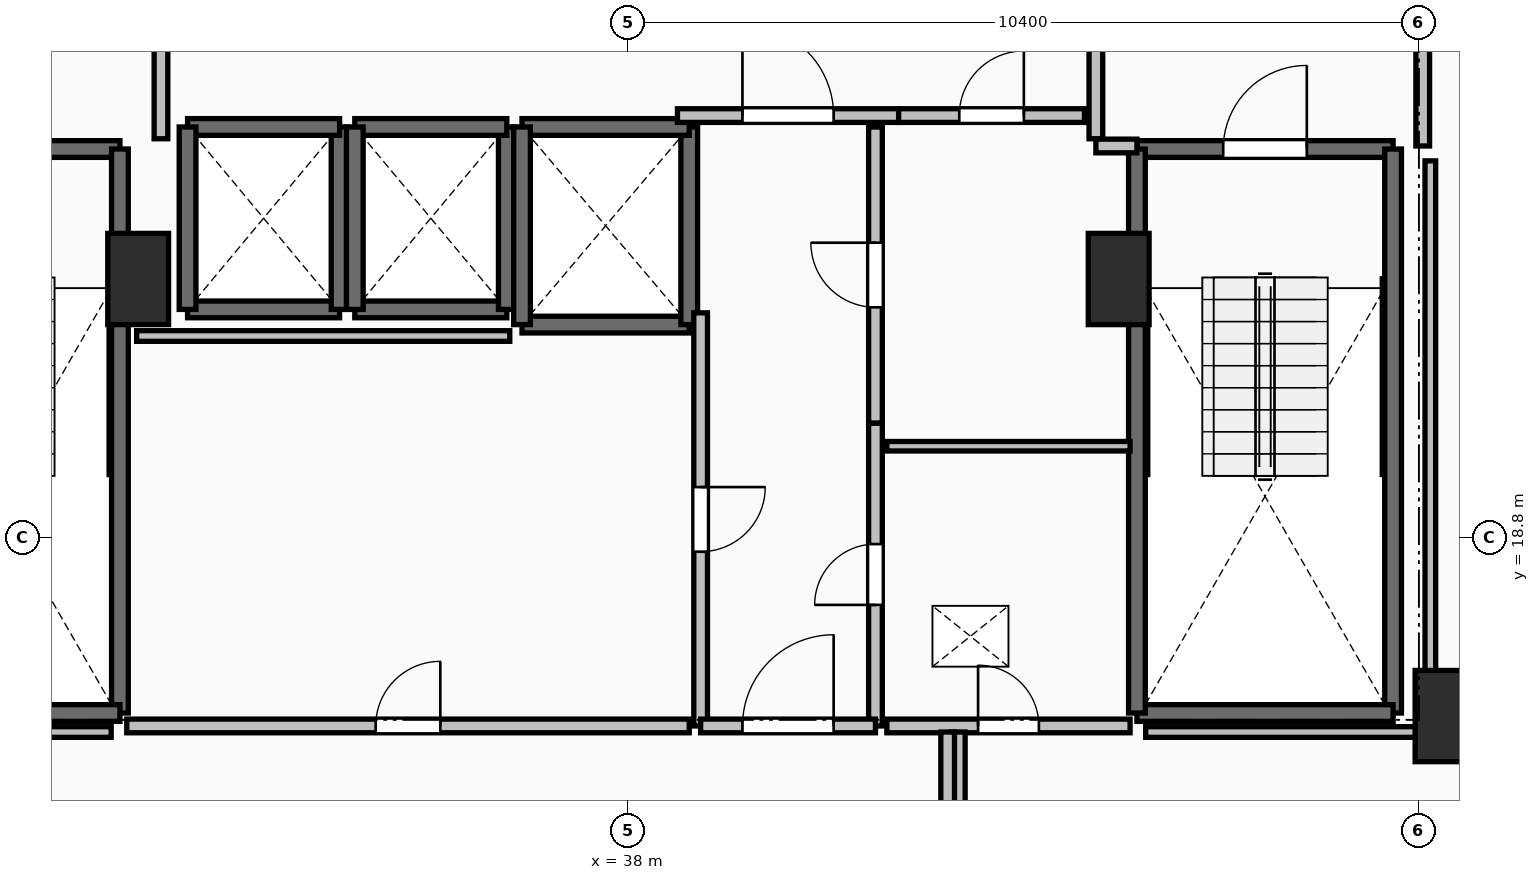
"""IFC4 building model, lengths in metres.
Left out: names, types, materials, properties, quantities, classifications, styles, units other than length and angle.
Written with IfcOpenShell. Run it as: python <this file> out.ifc"""

import sys

from ifc_helpers import new_model, si_unit, direction, frame, frame_2d, origin, origin_2d, place, context, subcontext, project, spatial, rectangle, extrude, element, fill, save


model = new_model("IFC4")
c1 = context("Model", 3, precision=1e-05, world=origin(), true_north=direction((0.0, 1.0)))
c2 = subcontext(c1, "Body", "Model", "MODEL_VIEW")
j1 = project(units=[si_unit("LENGTHUNIT", "METRE"), si_unit("PLANEANGLEUNIT", "RADIAN")], contexts=[c1])
p1 = place(None, origin())
s1 = spatial("IfcSite", under=j1, at=p1, CompositionType="ELEMENT")
p2 = place(p1, origin())
s2 = spatial("IfcBuilding", under=s1, at=p2, CompositionType="ELEMENT")
p3 = place(p2, frame((0.0, 0.0, 38.0)))
s3 = spatial("IfcBuildingStorey", under=s2, at=p3, CompositionType="ELEMENT", Elevation=38.0)
for number, where, z_axis, x_axis in (
    (1, (31.55, 22.2, 0.0), (0.0, 0.0, 1.0), (1.0, 0.0, 0.0)),
    (2, (48.75, 16.45, 0.0), (0.0, 0.0, 1.0), (1.0, 0.0, 0.0)),
    (3, (44.45, 22.2, 0.0), (0.0, 0.0, 1.0), (1.0, 0.0, 0.0)),
):
    element("IfcColumn", number, at=place(p3, frame(where, z_axis=z_axis, x_axis=x_axis)), inside=s3, PredefinedType="PILASTER", context=c2, shape_type="SweptSolid", body=[
        extrude(rectangle(XDim=0.8, YDim=1.2, at=origin_2d()), origin(), (0.0, 0.0, 1.0), 3.5),
    ])
p4 = place(p3, frame((27.94, 23.91, 0.0), z_axis=(0.0, 0.0, 1.0), x_axis=(1.0, 0.0, 0.0)))
e4 = element("IfcWall", 4, at=p4, inside=s3, PredefinedType="SOLIDWALL", context=c2, shape_type="SweptSolid", body=[
    extrude(rectangle(XDim=3.37, YDim=0.22, at=frame_2d((1.685, 0.0))), origin(), (0.0, 0.0, 1.0), 3.24),
])
p5 = place(p4, frame((1.135, 0.0, 0.0)))
e5 = element("IfcOpeningElement", 5, at=p5, cuts=e4, PredefinedType="OPENING", context=c2, shape_type="SweptSolid", body=[
    extrude(rectangle(XDim=1.1, YDim=2.15, at=frame_2d((0.55, 1.075))), frame((0.0, 0.125, 0.0), z_axis=(0.0, -1.0, 0.0), x_axis=(1.0, 0.0, 0.0)), (0.0, 0.0, 1.0), 0.25),
])
p6 = place(p3, frame((31.31, 23.91, 0.0), z_axis=(0.0, 0.0, 1.0), x_axis=(0.0, -1.0, 0.0)))
e6 = element("IfcWall", 6, at=p6, inside=s3, PredefinedType="SOLIDWALL", context=c2, shape_type="SweptSolid", body=[
    extrude(rectangle(XDim=7.42, YDim=0.22, at=frame_2d((3.71, 0.0))), origin(), (0.0, 0.0, 1.0), 3.24),
])
p7 = place(p3, frame((31.31, 16.49, 0.0), z_axis=(0.0, 0.0, 1.0), x_axis=(-1.0, 0.0, 0.0)))
e7 = element("IfcWall", 7, at=p7, inside=s3, PredefinedType="SOLIDWALL", context=c2, shape_type="SweptSolid", body=[
    extrude(rectangle(XDim=3.37, YDim=0.22, at=frame_2d((1.685, 0.0))), origin(), (0.0, 0.0, 1.0), 3.24),
])
p8 = place(p3, frame((44.69, 23.91, 0.0), z_axis=(0.0, 0.0, 1.0), x_axis=(1.0, 0.0, 0.0)))
e8 = element("IfcWall", 8, at=p8, inside=s3, PredefinedType="SOLIDWALL", context=c2, shape_type="SweptSolid", body=[
    extrude(rectangle(XDim=3.37, YDim=0.22, at=frame_2d((1.685, 0.0))), origin(), (0.0, 0.0, 1.0), 3.24),
])
p9 = place(p8, frame((1.135, 0.0, 0.0)))
e9 = element("IfcOpeningElement", 9, at=p9, cuts=e8, PredefinedType="OPENING", context=c2, shape_type="SweptSolid", body=[
    extrude(rectangle(XDim=1.1, YDim=2.15, at=frame_2d((0.55, 1.075))), frame((0.0, 0.125, 0.0), z_axis=(0.0, -1.0, 0.0), x_axis=(1.0, 0.0, 0.0)), (0.0, 0.0, 1.0), 0.25),
])
p10 = place(p3, frame((48.06, 23.91, 0.0), z_axis=(0.0, 0.0, 1.0), x_axis=(0.0, -1.0, 0.0)))
e10 = element("IfcWall", 10, at=p10, inside=s3, PredefinedType="SOLIDWALL", context=c2, shape_type="SweptSolid", body=[
    extrude(rectangle(XDim=7.42, YDim=0.22, at=frame_2d((3.71, 0.0))), origin(), (0.0, 0.0, 1.0), 3.24),
])
p11 = place(p3, frame((48.06, 16.49, 0.0), z_axis=(0.0, 0.0, 1.0), x_axis=(-1.0, 0.0, 0.0)))
e11 = element("IfcWall", 11, at=p11, inside=s3, PredefinedType="SOLIDWALL", context=c2, shape_type="SweptSolid", body=[
    extrude(rectangle(XDim=3.37, YDim=0.22, at=frame_2d((1.685, 0.0))), origin(), (0.0, 0.0, 1.0), 3.24),
])
p12 = place(p3, frame((44.69, 16.49, 0.0), z_axis=(0.0, 0.0, 1.0), x_axis=(0.0, 1.0, 0.0)))
e12 = element("IfcWall", 12, at=p12, inside=s3, PredefinedType="SOLIDWALL", context=c2, shape_type="SweptSolid", body=[
    extrude(rectangle(XDim=7.42, YDim=0.22, at=frame_2d((3.71, 0.0))), origin(), (0.0, 0.0, 1.0), 3.24),
])
p13 = place(p3, frame((32.2, 21.8, 0.0), z_axis=(0.0, 0.0, 1.0), x_axis=(1.0, 0.0, 0.0)))
e13 = element("IfcWall", 13, at=p13, inside=s3, PredefinedType="SOLIDWALL", context=c2, shape_type="SweptSolid", body=[
    extrude(rectangle(XDim=2.0, YDim=0.22, at=frame_2d((1.0, 0.0))), origin(), (0.0, 0.0, 1.0), 3.24),
])
p14 = place(p3, frame((34.2, 21.8, 0.0), z_axis=(0.0, 0.0, 1.0), x_axis=(0.0, 1.0, 0.0)))
e14 = element("IfcWall", 14, at=p14, inside=s3, PredefinedType="SOLIDWALL", context=c2, shape_type="SweptSolid", body=[
    extrude(rectangle(XDim=2.4, YDim=0.22, at=frame_2d((1.2, 0.0))), origin(), (0.0, 0.0, 1.0), 3.24),
])
p15 = place(p3, frame((34.2, 24.2, 0.0), z_axis=(0.0, 0.0, 1.0), x_axis=(-1.0, 0.0, 0.0)))
e15 = element("IfcWall", 15, at=p15, inside=s3, PredefinedType="SOLIDWALL", context=c2, shape_type="SweptSolid", body=[
    extrude(rectangle(XDim=2.0, YDim=0.22, at=frame_2d((1.0, 0.0))), origin(), (0.0, 0.0, 1.0), 3.24),
])
p16 = place(p3, frame((32.2, 24.2, 0.0), z_axis=(0.0, 0.0, 1.0), x_axis=(0.0, -1.0, 0.0)))
e16 = element("IfcWall", 16, at=p16, inside=s3, PredefinedType="SOLIDWALL", context=c2, shape_type="SweptSolid", body=[
    extrude(rectangle(XDim=2.4, YDim=0.22, at=frame_2d((1.2, 0.0))), origin(), (0.0, 0.0, 1.0), 3.24),
])
p17 = place(p3, frame((34.4, 21.8, 0.0), z_axis=(0.0, 0.0, 1.0), x_axis=(1.0, 0.0, 0.0)))
e17 = element("IfcWall", 17, at=p17, inside=s3, PredefinedType="SOLIDWALL", context=c2, shape_type="SweptSolid", body=[
    extrude(rectangle(XDim=2.0, YDim=0.22, at=frame_2d((1.0, 0.0))), origin(), (0.0, 0.0, 1.0), 3.24),
])
p18 = place(p3, frame((36.4, 21.8, 0.0), z_axis=(0.0, 0.0, 1.0), x_axis=(0.0, 1.0, 0.0)))
e18 = element("IfcWall", 18, at=p18, inside=s3, PredefinedType="SOLIDWALL", context=c2, shape_type="SweptSolid", body=[
    extrude(rectangle(XDim=2.4, YDim=0.22, at=frame_2d((1.2, 0.0))), origin(), (0.0, 0.0, 1.0), 3.24),
])
p19 = place(p3, frame((36.4, 24.2, 0.0), z_axis=(0.0, 0.0, 1.0), x_axis=(-1.0, 0.0, 0.0)))
e19 = element("IfcWall", 19, at=p19, inside=s3, PredefinedType="SOLIDWALL", context=c2, shape_type="SweptSolid", body=[
    extrude(rectangle(XDim=2.0, YDim=0.22, at=frame_2d((1.0, 0.0))), origin(), (0.0, 0.0, 1.0), 3.24),
])
p20 = place(p3, frame((34.4, 24.2, 0.0), z_axis=(0.0, 0.0, 1.0), x_axis=(0.0, -1.0, 0.0)))
e20 = element("IfcWall", 20, at=p20, inside=s3, PredefinedType="SOLIDWALL", context=c2, shape_type="SweptSolid", body=[
    extrude(rectangle(XDim=2.4, YDim=0.22, at=frame_2d((1.2, 0.0))), origin(), (0.0, 0.0, 1.0), 3.24),
])
p21 = place(p3, frame((36.6, 21.6, 0.0), z_axis=(0.0, 0.0, 1.0), x_axis=(1.0, 0.0, 0.0)))
e21 = element("IfcWall", 21, at=p21, inside=s3, PredefinedType="SOLIDWALL", context=c2, shape_type="SweptSolid", body=[
    extrude(rectangle(XDim=2.2, YDim=0.22, at=frame_2d((1.1, 0.0))), origin(), (0.0, 0.0, 1.0), 3.24),
])
p22 = place(p3, frame((38.8, 21.6, 0.0), z_axis=(0.0, 0.0, 1.0), x_axis=(0.0, 1.0, 0.0)))
e22 = element("IfcWall", 22, at=p22, inside=s3, PredefinedType="SOLIDWALL", context=c2, shape_type="SweptSolid", body=[
    extrude(rectangle(XDim=2.6, YDim=0.22, at=frame_2d((1.3, 0.0))), origin(), (0.0, 0.0, 1.0), 3.24),
])
p23 = place(p3, frame((38.8, 24.2, 0.0), z_axis=(0.0, 0.0, 1.0), x_axis=(-1.0, 0.0, 0.0)))
e23 = element("IfcWall", 23, at=p23, inside=s3, PredefinedType="SOLIDWALL", context=c2, shape_type="SweptSolid", body=[
    extrude(rectangle(XDim=2.2, YDim=0.22, at=frame_2d((1.1, 0.0))), origin(), (0.0, 0.0, 1.0), 3.24),
])
p24 = place(p3, frame((36.6, 24.2, 0.0), z_axis=(0.0, 0.0, 1.0), x_axis=(0.0, -1.0, 0.0)))
e24 = element("IfcWall", 24, at=p24, inside=s3, PredefinedType="SOLIDWALL", context=c2, shape_type="SweptSolid", body=[
    extrude(rectangle(XDim=2.6, YDim=0.22, at=frame_2d((1.3, 0.0))), origin(), (0.0, 0.0, 1.0), 3.24),
])
p25 = place(p3, frame((31.85, 24.045, 0.0), z_axis=(0.0, 0.0, 1.0), x_axis=(0.0, 1.0, 0.0)))
e25 = element("IfcWall", 25, at=p25, inside=s3, PredefinedType="PARTITIONING", context=c2, shape_type="SweptSolid", body=[
    extrude(rectangle(XDim=3.91, YDim=0.18, at=frame_2d((1.955, 0.0))), origin(), (0.0, 0.0, 1.0), 3.24),
])
p26 = place(p25, frame((1.355, 0.0, 0.0)))
e26 = element("IfcOpeningElement", 26, at=p26, cuts=e25, PredefinedType="OPENING", context=c2, shape_type="SweptSolid", body=[
    extrude(rectangle(XDim=1.2, YDim=2.15, at=frame_2d((0.6, 1.075))), frame((0.0, 0.105, 0.0), z_axis=(0.0, -1.0, 0.0), x_axis=(1.0, 0.0, 0.0)), (0.0, 0.0, 1.0), 0.21),
])
p27 = place(p3, frame((44.15, 27.955, 0.0), z_axis=(0.0, 0.0, 1.0), x_axis=(0.0, -1.0, 0.0)))
e27 = element("IfcWall", 27, at=p27, inside=s3, PredefinedType="PARTITIONING", context=c2, shape_type="SweptSolid", body=[
    extrude(rectangle(XDim=3.91, YDim=0.18, at=frame_2d((1.955, 0.0))), origin(), (0.0, 0.0, 1.0), 3.24),
])
p28 = place(p27, frame((1.355, 0.0, 0.0)))
e28 = element("IfcOpeningElement", 28, at=p28, cuts=e27, PredefinedType="OPENING", context=c2, shape_type="SweptSolid", body=[
    extrude(rectangle(XDim=1.2, YDim=2.15, at=frame_2d((0.6, 1.075))), frame((0.0, 0.105, 0.0), z_axis=(0.0, -1.0, 0.0), x_axis=(1.0, 0.0, 0.0)), (0.0, 0.0, 1.0), 0.21),
])
p29 = place(p3, frame((44.15, 23.95, 0.0), z_axis=(0.0, 0.0, 1.0), x_axis=(1.0, 0.0, 0.0)))
e29 = element("IfcWall", 29, at=p29, inside=s3, PredefinedType="PARTITIONING", context=c2, shape_type="SweptSolid", body=[
    extrude(rectangle(XDim=0.54, YDim=0.18, at=frame_2d((0.27, 0.0))), origin(), (0.0, 0.0, 1.0), 3.24),
])
p30 = place(p3, frame((48.45, 23.95, 0.0), z_axis=(0.0, 0.0, 1.0), x_axis=(0.0, 1.0, 0.0)))
e30 = element("IfcWall", 30, at=p30, inside=s3, PredefinedType="PARTITIONING", context=c2, shape_type="SweptSolid", body=[
    extrude(rectangle(XDim=4.05, YDim=0.18, at=frame_2d((2.025, 0.0))), origin(), (0.0, 0.0, 1.0), 3.24),
])
p31 = place(p30, frame((1.425, 0.0, 0.0)))
e31 = element("IfcOpeningElement", 31, at=p31, cuts=e30, PredefinedType="OPENING", context=c2, shape_type="SweptSolid", body=[
    extrude(rectangle(XDim=1.2, YDim=2.15, at=frame_2d((0.6, 1.075))), frame((0.0, 0.105, 0.0), z_axis=(0.0, -1.0, 0.0), x_axis=(1.0, 0.0, 0.0)), (0.0, 0.0, 1.0), 0.21),
])
p32 = place(p3, frame((38.645, 24.35, 0.0), z_axis=(0.0, 0.0, 1.0), x_axis=(1.0, 0.0, 0.0)))
e32 = element("IfcWall", 32, at=p32, inside=s3, PredefinedType="PARTITIONING", context=c2, shape_type="SweptSolid", body=[
    extrude(rectangle(XDim=2.91, YDim=0.18, at=frame_2d((1.455, 0.0))), origin(), (0.0, 0.0, 1.0), 3.24),
])
p33 = place(p32, frame((0.855, 0.0, 0.0)))
e33 = element("IfcOpeningElement", 33, at=p33, cuts=e32, PredefinedType="OPENING", context=c2, shape_type="SweptSolid", body=[
    extrude(rectangle(XDim=1.2, YDim=2.15, at=frame_2d((0.6, 1.075))), frame((0.0, 0.105, 0.0), z_axis=(0.0, -1.0, 0.0), x_axis=(1.0, 0.0, 0.0)), (0.0, 0.0, 1.0), 0.21),
])
p34 = place(p3, frame((41.555, 24.35, 0.0), z_axis=(0.0, 0.0, 1.0), x_axis=(1.0, 0.0, 0.0)))
e34 = element("IfcWall", 34, at=p34, inside=s3, PredefinedType="PARTITIONING", context=c2, shape_type="SweptSolid", body=[
    extrude(rectangle(XDim=2.445, YDim=0.18, at=frame_2d((1.223, 0.0))), origin(), (0.0, 0.0, 1.0), 3.24),
])
p35 = place(p34, frame((0.798, 0.0, 0.0)))
e35 = element("IfcOpeningElement", 35, at=p35, cuts=e34, PredefinedType="OPENING", context=c2, shape_type="SweptSolid", body=[
    extrude(rectangle(XDim=0.85, YDim=2.1, at=frame_2d((0.425, 1.05))), frame((0.0, 0.105, 0.0), z_axis=(0.0, -1.0, 0.0), x_axis=(1.0, 0.0, 0.0)), (0.0, 0.0, 1.0), 0.21),
])
p36 = place(p3, frame((41.25, 16.32, 0.0), z_axis=(0.0, 0.0, 1.0), x_axis=(0.0, 1.0, 0.0)))
e36 = element("IfcWall", 36, at=p36, inside=s3, PredefinedType="PARTITIONING", context=c2, shape_type="SweptSolid", body=[
    extrude(rectangle(XDim=3.985, YDim=0.18, at=frame_2d((1.992, 0.0))), origin(), (0.0, 0.0, 1.0), 3.24),
])
p37 = place(p36, frame((1.593, 0.0, 0.0)))
e37 = element("IfcOpeningElement", 37, at=p37, cuts=e36, PredefinedType="OPENING", context=c2, shape_type="SweptSolid", body=[
    extrude(rectangle(XDim=0.8, YDim=2.05, at=frame_2d((0.4, 1.025))), frame((0.0, 0.105, 0.0), z_axis=(0.0, -1.0, 0.0), x_axis=(1.0, 0.0, 0.0)), (0.0, 0.0, 1.0), 0.21),
])
p38 = place(p3, frame((41.25, 20.305, 0.0), z_axis=(0.0, 0.0, 1.0), x_axis=(0.0, 1.0, 0.0)))
e38 = element("IfcWall", 38, at=p38, inside=s3, PredefinedType="PARTITIONING", context=c2, shape_type="SweptSolid", body=[
    extrude(rectangle(XDim=3.895, YDim=0.18, at=frame_2d((1.948, 0.0))), origin(), (0.0, 0.0, 1.0), 3.24),
])
p39 = place(p38, frame((1.522, 0.0, 0.0)))
e39 = element("IfcOpeningElement", 39, at=p39, cuts=e38, PredefinedType="OPENING", context=c2, shape_type="SweptSolid", body=[
    extrude(rectangle(XDim=0.85, YDim=2.1, at=frame_2d((0.425, 1.05))), frame((0.0, 0.105, 0.0), z_axis=(0.0, -1.0, 0.0), x_axis=(1.0, 0.0, 0.0)), (0.0, 0.0, 1.0), 0.21),
])
p40 = place(p3, frame((38.95, 21.755, 0.0), z_axis=(0.0, 0.0, 1.0), x_axis=(0.0, -1.0, 0.0)))
e40 = element("IfcWall", 40, at=p40, inside=s3, PredefinedType="PARTITIONING", context=c2, shape_type="SweptSolid", body=[
    extrude(rectangle(XDim=5.435, YDim=0.18, at=frame_2d((2.717, 0.0))), origin(), (0.0, 0.0, 1.0), 3.24),
])
p41 = place(p40, frame((2.292, 0.0, 0.0)))
e41 = element("IfcOpeningElement", 41, at=p41, cuts=e40, PredefinedType="OPENING", context=c2, shape_type="SweptSolid", body=[
    extrude(rectangle(XDim=0.85, YDim=2.1, at=frame_2d((0.425, 1.05))), frame((0.0, 0.105, 0.0), z_axis=(0.0, -1.0, 0.0), x_axis=(1.0, 0.0, 0.0)), (0.0, 0.0, 1.0), 0.21),
])
p42 = place(p3, frame((38.95, 16.32, 0.0), z_axis=(0.0, 0.0, 1.0), x_axis=(1.0, 0.0, 0.0)))
e42 = element("IfcWall", 42, at=p42, inside=s3, PredefinedType="PARTITIONING", context=c2, shape_type="SweptSolid", body=[
    extrude(rectangle(XDim=2.3, YDim=0.18, at=frame_2d((1.15, 0.0))), origin(), (0.0, 0.0, 1.0), 3.24),
])
p43 = place(p42, frame((0.55, 0.0, 0.0)))
e43 = element("IfcOpeningElement", 43, at=p43, cuts=e42, PredefinedType="OPENING", context=c2, shape_type="SweptSolid", body=[
    extrude(rectangle(XDim=1.2, YDim=2.15, at=frame_2d((0.6, 1.075))), frame((0.0, 0.105, 0.0), z_axis=(0.0, -1.0, 0.0), x_axis=(1.0, 0.0, 0.0)), (0.0, 0.0, 1.0), 0.21),
])
p44 = place(p3, frame((44.6, 20.0, 0.0), z_axis=(0.0, 0.0, 1.0), x_axis=(-1.0, 0.0, 0.0)))
e44 = element("IfcWall", 44, at=p44, inside=s3, PredefinedType="PARTITIONING", context=c2, shape_type="SweptSolid", body=[
    extrude(rectangle(XDim=3.2, YDim=0.125, at=frame_2d((1.6, 0.0))), origin(), (0.0, 0.0, 1.0), 3.24),
])
p45 = place(p3, frame((41.4, 16.32, 0.0), z_axis=(0.0, 0.0, 1.0), x_axis=(1.0, 0.0, 0.0)))
e45 = element("IfcWall", 45, at=p45, inside=s3, PredefinedType="PARTITIONING", context=c2, shape_type="SweptSolid", body=[
    extrude(rectangle(XDim=3.2, YDim=0.18, at=frame_2d((1.6, 0.0))), origin(), (0.0, 0.0, 1.0), 3.24),
])
p46 = place(p45, frame((1.2, 0.0, 0.0)))
e46 = element("IfcOpeningElement", 46, at=p46, cuts=e45, PredefinedType="OPENING", context=c2, shape_type="SweptSolid", body=[
    extrude(rectangle(XDim=0.8, YDim=2.05, at=frame_2d((0.4, 1.025))), frame((0.0, 0.105, 0.0), z_axis=(0.0, -1.0, 0.0), x_axis=(1.0, 0.0, 0.0)), (0.0, 0.0, 1.0), 0.21),
])
p47 = place(p3, frame((31.4, 16.32, 0.0), z_axis=(0.0, 0.0, 1.0), x_axis=(1.0, 0.0, 0.0)))
e47 = element("IfcWall", 47, at=p47, inside=s3, PredefinedType="PARTITIONING", context=c2, shape_type="SweptSolid", body=[
    extrude(rectangle(XDim=7.4, YDim=0.18, at=frame_2d((3.7, 0.0))), origin(), (0.0, 0.0, 1.0), 3.24),
])
p48 = place(p47, frame((3.275, 0.0, 0.0)))
e48 = element("IfcOpeningElement", 48, at=p48, cuts=e47, PredefinedType="OPENING", context=c2, shape_type="SweptSolid", body=[
    extrude(rectangle(XDim=0.85, YDim=2.1, at=frame_2d((0.425, 1.05))), frame((0.0, 0.105, 0.0), z_axis=(0.0, -1.0, 0.0), x_axis=(1.0, 0.0, 0.0)), (0.0, 0.0, 1.0), 0.21),
])
for number, where, z_axis, x_axis in (
    (49, (42.34, 16.24, 0.0), (0.0, 0.0, 1.0), (0.0, -1.0, 0.0)),
    (50, (42.2, 14.1, 0.0), (0.0, 0.0, 1.0), (0.0, 1.0, 0.0)),
):
    element("IfcWall", number, at=place(p3, frame(where, z_axis=z_axis, x_axis=x_axis)), inside=s3, PredefinedType="PARTITIONING", context=c2, shape_type="SweptSolid", body=[
        extrude(rectangle(XDim=2.14, YDim=0.18, at=frame_2d((1.07, 0.0))), origin(), (0.0, 0.0, 1.0), 3.24),
    ])
p49 = place(p3, frame((36.439, 21.45, 0.0), z_axis=(0.0, 0.0, 1.0), x_axis=(-1.0, 0.0, 0.0)))
e51 = element("IfcWall", 51, at=p49, inside=s3, PredefinedType="PARTITIONING", context=c2, shape_type="SweptSolid", body=[
    extrude(rectangle(XDim=4.909, YDim=0.14, at=frame_2d((2.455, 0.0))), origin(), (0.0, 0.0, 1.0), 3.24),
])
p50 = place(p3, frame((48.55, 23.754, 0.0), z_axis=(0.0, 0.0, 1.0), x_axis=(0.0, -1.0, 0.0)))
e52 = element("IfcWall", 52, at=p50, inside=s3, PredefinedType="PARTITIONING", context=c2, shape_type="SweptSolid", body=[
    extrude(rectangle(XDim=7.514, YDim=0.14, at=frame_2d((3.757, 0.0))), origin(), (0.0, 0.0, 1.0), 2.432),
])
for number, where, z_axis, x_axis in (
    (53, (48.55, 16.24, 0.0), (0.0, 0.0, 1.0), (-1.0, 0.0, 0.0)),
    (54, (31.195, 16.24, 0.0), (0.0, 0.0, 1.0), (-1.0, 0.0, 0.0)),
):
    element("IfcWall", number, at=place(p3, frame(where, z_axis=z_axis, x_axis=x_axis)), inside=s3, PredefinedType="PARTITIONING", context=c2, shape_type="SweptSolid", body=[
        extrude(rectangle(XDim=3.745, YDim=0.14, at=frame_2d((1.873, 0.0))), origin(), (0.0, 0.0, 1.0), 2.432),
    ])
p51 = place(p9, origin())
e55 = element("IfcDoor", 55, at=p51, inside=s3, OperationType="SINGLE_SWING_RIGHT", PredefinedType="DOOR", context=c2, shape_type="SweptSolid", body=[
    extrude(rectangle(XDim=1.1, YDim=2.15, at=frame_2d((0.55, 1.075))), frame((0.0, 0.025, 0.0), z_axis=(0.0, -1.0, 0.0), x_axis=(1.0, 0.0, 0.0)), (0.0, 0.0, 1.0), 0.05),
])
fill(e9, e55)
p52 = place(p33, origin())
e56 = element("IfcDoor", 56, at=p52, inside=s3, OperationType="SINGLE_SWING_LEFT", PredefinedType="DOOR", context=c2, shape_type="SweptSolid", body=[
    extrude(rectangle(XDim=1.2, YDim=2.15, at=frame_2d((0.6, 1.075))), frame((0.0, 0.025, 0.0), z_axis=(0.0, -1.0, 0.0), x_axis=(1.0, 0.0, 0.0)), (0.0, 0.0, 1.0), 0.05),
])
fill(e33, e56)
p53 = place(p35, origin())
e57 = element("IfcDoor", 57, at=p53, inside=s3, OperationType="SINGLE_SWING_RIGHT", PredefinedType="DOOR", context=c2, shape_type="SweptSolid", body=[
    extrude(rectangle(XDim=0.85, YDim=2.1, at=frame_2d((0.425, 1.05))), frame((0.0, 0.025, 0.0), z_axis=(0.0, -1.0, 0.0), x_axis=(1.0, 0.0, 0.0)), (0.0, 0.0, 1.0), 0.05),
])
fill(e35, e57)
p54 = place(p37, origin())
e58 = element("IfcDoor", 58, at=p54, inside=s3, OperationType="SINGLE_SWING_LEFT", PredefinedType="DOOR", context=c2, shape_type="SweptSolid", body=[
    extrude(rectangle(XDim=0.8, YDim=2.05, at=frame_2d((0.4, 1.025))), frame((0.0, 0.025, 0.0), z_axis=(0.0, -1.0, 0.0), x_axis=(1.0, 0.0, 0.0)), (0.0, 0.0, 1.0), 0.05),
])
fill(e37, e58)
p55 = place(p39, origin())
e59 = element("IfcDoor", 59, at=p55, inside=s3, OperationType="SINGLE_SWING_RIGHT", PredefinedType="DOOR", context=c2, shape_type="SweptSolid", body=[
    extrude(rectangle(XDim=0.85, YDim=2.1, at=frame_2d((0.425, 1.05))), frame((0.0, 0.025, 0.0), z_axis=(0.0, -1.0, 0.0), x_axis=(1.0, 0.0, 0.0)), (0.0, 0.0, 1.0), 0.05),
])
fill(e39, e59)
p56 = place(p41, origin())
e60 = element("IfcDoor", 60, at=p56, inside=s3, OperationType="SINGLE_SWING_LEFT", PredefinedType="DOOR", context=c2, shape_type="SweptSolid", body=[
    extrude(rectangle(XDim=0.85, YDim=2.1, at=frame_2d((0.425, 1.05))), frame((0.0, 0.025, 0.0), z_axis=(0.0, -1.0, 0.0), x_axis=(1.0, 0.0, 0.0)), (0.0, 0.0, 1.0), 0.05),
])
fill(e41, e60)
p57 = place(p43, origin())
e61 = element("IfcDoor", 61, at=p57, inside=s3, OperationType="SINGLE_SWING_RIGHT", PredefinedType="DOOR", context=c2, shape_type="SweptSolid", body=[
    extrude(rectangle(XDim=1.2, YDim=2.15, at=frame_2d((0.6, 1.075))), frame((0.0, 0.025, 0.0), z_axis=(0.0, -1.0, 0.0), x_axis=(1.0, 0.0, 0.0)), (0.0, 0.0, 1.0), 0.05),
])
fill(e43, e61)
p58 = place(p46, origin())
e62 = element("IfcDoor", 62, at=p58, inside=s3, OperationType="SINGLE_SWING_LEFT", PredefinedType="DOOR", context=c2, shape_type="SweptSolid", body=[
    extrude(rectangle(XDim=0.8, YDim=2.05, at=frame_2d((0.4, 1.025))), frame((0.0, 0.025, 0.0), z_axis=(0.0, -1.0, 0.0), x_axis=(1.0, 0.0, 0.0)), (0.0, 0.0, 1.0), 0.05),
])
fill(e46, e62)
p59 = place(p48, origin())
e63 = element("IfcDoor", 63, at=p59, inside=s3, OperationType="SINGLE_SWING_RIGHT", PredefinedType="DOOR", context=c2, shape_type="SweptSolid", body=[
    extrude(rectangle(XDim=0.85, YDim=2.1, at=frame_2d((0.425, 1.05))), frame((0.0, 0.025, 0.0), z_axis=(0.0, -1.0, 0.0), x_axis=(1.0, 0.0, 0.0)), (0.0, 0.0, 1.0), 0.05),
])
fill(e48, e63)
save(model, sys.argv[1])
